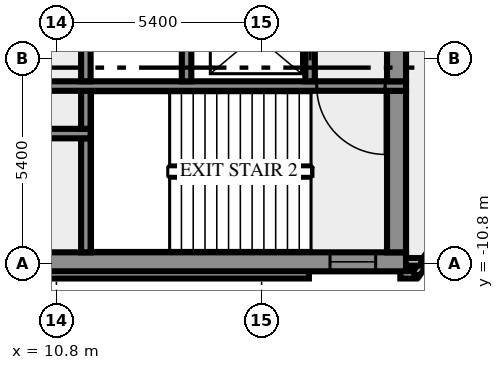
"""IFC4 building model, lengths in metres.
Left out: names, types, materials, properties, quantities, classifications, styles, units other than length and angle.
Written with IfcOpenShell. Run it as: python <this file> out.ifc"""

import sys

from ifc_helpers import new_model, si_unit, direction, frame, frame_2d, origin, place, context, subcontext, project, spatial, rectangle, extrude, element, fill, save


model = new_model("IFC4")
c1 = context("Model", 3, precision=1e-05, world=origin(), true_north=direction((0.0, 1.0)))
c2 = subcontext(c1, "Body", "Model", "MODEL_VIEW")
j1 = project(units=[si_unit("LENGTHUNIT", "METRE"), si_unit("PLANEANGLEUNIT", "RADIAN")], contexts=[c1])
p1 = place(None, origin())
s1 = spatial("IfcSite", under=j1, at=p1, CompositionType="ELEMENT")
p2 = place(p1, origin())
s2 = spatial("IfcBuilding", under=s1, at=p2, CompositionType="ELEMENT")
p3 = place(p2, frame((0.0, 0.0, 257.0)))
s3 = spatial("IfcBuildingStorey", under=s2, at=p3, CompositionType="ELEMENT", Elevation=257.0)
p4 = place(p3, frame((-17.444, -11.088, 0.0), z_axis=(0.0, 0.0, 1.0), x_axis=(1.0, 0.0, 0.0)))
e1 = element("IfcWall", 1, at=p4, inside=s3, PredefinedType="SOLIDWALL", context=c2, shape_type="SweptSolid", body=[
    extrude(rectangle(XDim=34.888, YDim=0.2, at=frame_2d((17.444, 0.0))), origin(), (0.0, 0.0, 1.0), 3.65),
])
p5 = place(p3, frame((19.85, -11.088, 0.0), z_axis=(0.0, 0.0, 1.0), x_axis=(1.0, 0.0, 0.0)))
e2 = element("IfcWall", 2, at=p5, inside=s3, PredefinedType="SOLIDWALL", context=c2, shape_type="SweptSolid", body=[
    extrude(rectangle(XDim=0.406, YDim=0.2, at=frame_2d((0.203, 0.0))), origin(), (0.0, 0.0, 1.0), 3.65),
])
p6 = place(p3, frame((20.253, -11.083, 0.0), z_axis=(0.0, 0.0, 1.0), x_axis=(0.587766567315, 0.809030569476, 0.0)))
e3 = element("IfcWall", 3, at=p6, inside=s3, PredefinedType="SOLIDWALL", context=c2, shape_type="SweptSolid", body=[
    extrude(rectangle(XDim=2.688, YDim=0.2, at=frame_2d((1.344, 0.0))), origin(), (0.0, 0.0, 1.0), 3.65),
])
p7 = place(p3, frame((19.98, -10.75, 0.0), z_axis=(0.0, 0.0, 1.0), x_axis=(1.0, 0.0, 0.0)))
e4 = element("IfcWall", 4, at=p7, inside=s3, PredefinedType="SOLIDWALL", context=c2, shape_type="SweptSolid", body=[
    extrude(rectangle(XDim=0.417, YDim=0.2, at=frame_2d((0.208, 0.0))), origin(), (0.0, 0.0, 1.0), 3.65),
])
p8 = place(p3, frame((-20.0, -10.75, 0.0), z_axis=(0.0, 0.0, 1.0), x_axis=(1.0, 0.0, 0.0)))
e5 = element("IfcWall", 5, at=p8, inside=s3, PredefinedType="SHEAR", context=c2, shape_type="SweptSolid", body=[
    extrude(rectangle(XDim=40.0, YDim=0.5, at=frame_2d((20.0, 0.0))), origin(), (0.0, 0.0, 1.0), 3.65),
])
p9 = place(p8, frame((0.8, 0.0, 1.0)))
e6 = element("IfcOpeningElement", 6, at=p9, cuts=e5, PredefinedType="OPENING", context=c2, shape_type="SweptSolid", body=[
    extrude(rectangle(XDim=1.2, YDim=1.2, at=frame_2d((0.6, 0.6))), frame((0.0, 0.26, 0.0), z_axis=(0.0, -1.0, 0.0), x_axis=(1.0, 0.0, 0.0)), (0.0, 0.0, 1.0), 0.52),
])
p10 = place(p8, frame((38.0, 0.0, 1.0)))
e7 = element("IfcOpeningElement", 7, at=p10, cuts=e5, PredefinedType="OPENING", context=c2, shape_type="SweptSolid", body=[
    extrude(rectangle(XDim=1.2, YDim=1.2, at=frame_2d((0.6, 0.6))), frame((0.0, 0.26, 0.0), z_axis=(0.0, -1.0, 0.0), x_axis=(1.0, 0.0, 0.0)), (0.0, 0.0, 1.0), 0.52),
])
p11 = place(p3, frame((11.575, -10.5, 0.0), z_axis=(0.0, 0.0, 1.0), x_axis=(0.0, 1.0, 0.0)))
e8 = element("IfcWall", 8, at=p11, inside=s3, PredefinedType="SHEAR", context=c2, shape_type="SweptSolid", body=[
    extrude(rectangle(XDim=3.0, YDim=0.25, at=frame_2d((1.5, 0.0))), origin(), (0.0, 0.0, 1.0), 3.65),
])
p12 = place(p3, frame((19.75, -10.5, 0.0), z_axis=(0.0, 0.0, 1.0), x_axis=(0.0, 1.0, 0.0)))
e9 = element("IfcWall", 9, at=p12, inside=s3, PredefinedType="SHEAR", context=c2, shape_type="SweptSolid", body=[
    extrude(rectangle(XDim=4.25, YDim=0.5, at=frame_2d((2.125, 0.0))), origin(), (0.0, 0.0, 1.0), 3.65),
])
p13 = place(p3, frame((11.7, -7.375, 0.0), z_axis=(0.0, 0.0, 1.0), x_axis=(-1.0, 0.0, 0.0)))
e10 = element("IfcWall", 10, at=p13, inside=s3, PredefinedType="SHEAR", context=c2, shape_type="SweptSolid", body=[
    extrude(rectangle(XDim=23.4, YDim=0.25, at=frame_2d((11.7, 0.0))), origin(), (0.0, 0.0, 1.0), 3.65),
])
p14 = place(p13, frame((22.225, 0.0, 0.0)))
e11 = element("IfcOpeningElement", 11, at=p14, cuts=e10, PredefinedType="OPENING", context=c2, shape_type="SweptSolid", body=[
    extrude(rectangle(XDim=0.8, YDim=2.1, at=frame_2d((0.4, 1.05))), frame((0.0, 0.135, 0.0), z_axis=(0.0, -1.0, 0.0), x_axis=(1.0, 0.0, 0.0)), (0.0, 0.0, 1.0), 0.27),
])
p15 = place(p13, frame((20.2, 0.0, 0.0)))
e12 = element("IfcOpeningElement", 12, at=p15, cuts=e10, PredefinedType="OPENING", context=c2, shape_type="SweptSolid", body=[
    extrude(rectangle(XDim=1.1, YDim=2.1, at=frame_2d((0.55, 1.05))), frame((0.0, 0.135, 0.0), z_axis=(0.0, -1.0, 0.0), x_axis=(1.0, 0.0, 0.0)), (0.0, 0.0, 1.0), 0.27),
])
p16 = place(p13, frame((17.7, 0.0, 0.0)))
e13 = element("IfcOpeningElement", 13, at=p16, cuts=e10, PredefinedType="OPENING", context=c2, shape_type="SweptSolid", body=[
    extrude(rectangle(XDim=1.1, YDim=2.1, at=frame_2d((0.55, 1.05))), frame((0.0, 0.135, 0.0), z_axis=(0.0, -1.0, 0.0), x_axis=(1.0, 0.0, 0.0)), (0.0, 0.0, 1.0), 0.27),
])
p17 = place(p13, frame((15.975, 0.0, 0.0)))
e14 = element("IfcOpeningElement", 14, at=p17, cuts=e10, PredefinedType="OPENING", context=c2, shape_type="SweptSolid", body=[
    extrude(rectangle(XDim=0.8, YDim=2.1, at=frame_2d((0.4, 1.05))), frame((0.0, 0.135, 0.0), z_axis=(0.0, -1.0, 0.0), x_axis=(1.0, 0.0, 0.0)), (0.0, 0.0, 1.0), 0.27),
])
p18 = place(p13, frame((14.75, 0.0, 0.0)))
e15 = element("IfcOpeningElement", 15, at=p18, cuts=e10, PredefinedType="OPENING", context=c2, shape_type="SweptSolid", body=[
    extrude(rectangle(XDim=0.7, YDim=2.1, at=frame_2d((0.35, 1.05))), frame((0.0, 0.135, 0.0), z_axis=(0.0, -1.0, 0.0), x_axis=(1.0, 0.0, 0.0)), (0.0, 0.0, 1.0), 0.27),
])
p19 = place(p13, frame((13.35, 0.0, 0.0)))
e16 = element("IfcOpeningElement", 16, at=p19, cuts=e10, PredefinedType="OPENING", context=c2, shape_type="SweptSolid", body=[
    extrude(rectangle(XDim=0.9, YDim=2.1, at=frame_2d((0.45, 1.05))), frame((0.0, 0.135, 0.0), z_axis=(0.0, -1.0, 0.0), x_axis=(1.0, 0.0, 0.0)), (0.0, 0.0, 1.0), 0.27),
])
p20 = place(p13, frame((11.975, 0.0, 0.0)))
e17 = element("IfcOpeningElement", 17, at=p20, cuts=e10, PredefinedType="OPENING", context=c2, shape_type="SweptSolid", body=[
    extrude(rectangle(XDim=0.9, YDim=2.1, at=frame_2d((0.45, 1.05))), frame((0.0, 0.135, 0.0), z_axis=(0.0, -1.0, 0.0), x_axis=(1.0, 0.0, 0.0)), (0.0, 0.0, 1.0), 0.27),
])
p21 = place(p13, frame((10.5, 0.0, 0.0)))
e18 = element("IfcOpeningElement", 18, at=p21, cuts=e10, PredefinedType="OPENING", context=c2, shape_type="SweptSolid", body=[
    extrude(rectangle(XDim=0.9, YDim=2.1, at=frame_2d((0.45, 1.05))), frame((0.0, 0.135, 0.0), z_axis=(0.0, -1.0, 0.0), x_axis=(1.0, 0.0, 0.0)), (0.0, 0.0, 1.0), 0.27),
])
p22 = place(p13, frame((8.388, 0.0, 0.0)))
e19 = element("IfcOpeningElement", 19, at=p22, cuts=e10, PredefinedType="OPENING", context=c2, shape_type="SweptSolid", body=[
    extrude(rectangle(XDim=0.9, YDim=2.1, at=frame_2d((0.45, 1.05))), frame((0.0, 0.135, 0.0), z_axis=(0.0, -1.0, 0.0), x_axis=(1.0, 0.0, 0.0)), (0.0, 0.0, 1.0), 0.27),
])
p23 = place(p13, frame((5.375, 0.0, 0.0)))
e20 = element("IfcOpeningElement", 20, at=p23, cuts=e10, PredefinedType="OPENING", context=c2, shape_type="SweptSolid", body=[
    extrude(rectangle(XDim=0.9, YDim=2.1, at=frame_2d((0.45, 1.05))), frame((0.0, 0.135, 0.0), z_axis=(0.0, -1.0, 0.0), x_axis=(1.0, 0.0, 0.0)), (0.0, 0.0, 1.0), 0.27),
])
p24 = place(p13, frame((1.688, 0.0, 0.0)))
e21 = element("IfcOpeningElement", 21, at=p24, cuts=e10, PredefinedType="OPENING", context=c2, shape_type="SweptSolid", body=[
    extrude(rectangle(XDim=0.9, YDim=2.1, at=frame_2d((0.45, 1.05))), frame((0.0, 0.135, 0.0), z_axis=(0.0, -1.0, 0.0), x_axis=(1.0, 0.0, 0.0)), (0.0, 0.0, 1.0), 0.27),
])
p25 = place(p3, frame((11.575, -7.25, 0.0), z_axis=(0.0, 0.0, 1.0), x_axis=(0.0, 1.0, 0.0)))
e22 = element("IfcWall", 22, at=p25, inside=s3, PredefinedType="SHEAR", context=c2, shape_type="SweptSolid", body=[
    extrude(rectangle(XDim=1.0, YDim=0.25, at=frame_2d((0.5, 0.0))), origin(), (0.0, 0.0, 1.0), 3.65),
])
p26 = place(p3, frame((20.0, -6.125, 0.0), z_axis=(0.0, 0.0, 1.0), x_axis=(-1.0, 0.0, 0.0)))
e23 = element("IfcWall", 23, at=p26, inside=s3, PredefinedType="SHEAR", context=c2, shape_type="SweptSolid", body=[
    extrude(rectangle(XDim=10.2, YDim=0.25, at=frame_2d((5.1, 0.0))), origin(), (0.0, 0.0, 1.0), 3.65),
])
p27 = place(p26, frame((0.55, 0.0, 0.0)))
e24 = element("IfcOpeningElement", 24, at=p27, cuts=e23, PredefinedType="OPENING", context=c2, shape_type="SweptSolid", body=[
    extrude(rectangle(XDim=1.8, YDim=2.1, at=frame_2d((0.9, 1.05))), frame((0.0, 0.135, 0.0), z_axis=(0.0, -1.0, 0.0), x_axis=(1.0, 0.0, 0.0)), (0.0, 0.0, 1.0), 0.27),
])
for number, where, z_axis, x_axis in (
    (25, (11.575, -6.0, 0.0), (0.0, 0.0, 1.0), (0.0, 1.0, 0.0)),
    (26, (14.225, -6.0, 0.0), (0.0, 0.0, 1.0), (0.0, 1.0, 0.0)),
):
    element("IfcWall", number, at=place(p3, frame(where, z_axis=z_axis, x_axis=x_axis)), inside=s3, PredefinedType="SHEAR", context=c2, shape_type="SweptSolid", body=[
        extrude(rectangle(XDim=1.75, YDim=0.25, at=frame_2d((0.875, 0.0))), origin(), (0.0, 0.0, 1.0), 3.65),
    ])
p28 = place(p3, frame((17.475, -6.0, 0.0), z_axis=(0.0, 0.0, 1.0), x_axis=(0.0, 1.0, 0.0)))
e27 = element("IfcWall", 27, at=p28, inside=s3, PredefinedType="SHEAR", context=c2, shape_type="SweptSolid", body=[
    extrude(rectangle(XDim=4.3, YDim=0.25, at=frame_2d((2.15, 0.0))), origin(), (0.0, 0.0, 1.0), 3.65),
])
p29 = place(p28, frame((0.55, 0.0, 0.0)))
e28 = element("IfcOpeningElement", 28, at=p29, cuts=e27, PredefinedType="OPENING", context=c2, shape_type="SweptSolid", body=[
    extrude(rectangle(XDim=1.3, YDim=2.1, at=frame_2d((0.65, 1.05))), frame((0.0, 0.135, 0.0), z_axis=(0.0, -1.0, 0.0), x_axis=(1.0, 0.0, 0.0)), (0.0, 0.0, 1.0), 0.27),
])
p30 = place(p3, frame((19.75, -6.0, 0.0), z_axis=(0.0, 0.0, 1.0), x_axis=(0.0, 1.0, 0.0)))
e29 = element("IfcWall", 29, at=p30, inside=s3, PredefinedType="SHEAR", context=c2, shape_type="SweptSolid", body=[
    extrude(rectangle(XDim=4.3, YDim=0.5, at=frame_2d((2.15, 0.0))), origin(), (0.0, 0.0, 1.0), 3.65),
])
p31 = place(p10, origin())
e30 = element("IfcWindow", 30, at=p31, inside=s3, PartitioningType="SINGLE_PANEL", PredefinedType="WINDOW", context=c2, shape_type="SweptSolid", body=[
    extrude(rectangle(XDim=1.2, YDim=1.2, at=frame_2d((0.6, 0.6))), frame((0.0, 0.03, 0.0), z_axis=(0.0, -1.0, 0.0), x_axis=(1.0, 0.0, 0.0)), (0.0, 0.0, 1.0), 0.06),
])
fill(e7, e30)
p32 = place(p27, origin())
e31 = element("IfcDoor", 31, at=p32, inside=s3, OperationType="DOUBLE_DOOR_SINGLE_SWING", PredefinedType="DOOR", context=c2, shape_type="SweptSolid", body=[
    extrude(rectangle(XDim=1.8, YDim=2.1, at=frame_2d((0.9, 1.05))), frame((0.0, 0.025, 0.0), z_axis=(0.0, -1.0, 0.0), x_axis=(1.0, 0.0, 0.0)), (0.0, 0.0, 1.0), 0.05),
])
fill(e24, e31)
p33 = place(p29, origin())
e32 = element("IfcDoor", 32, at=p33, inside=s3, OperationType="DOUBLE_DOOR_SLIDING", PredefinedType="DOOR", context=c2, shape_type="SweptSolid", body=[
    extrude(rectangle(XDim=1.3, YDim=2.1, at=frame_2d((0.65, 1.05))), frame((0.0, 0.025, 0.0), z_axis=(0.0, -1.0, 0.0), x_axis=(1.0, 0.0, 0.0)), (0.0, 0.0, 1.0), 0.05),
])
fill(e28, e32)
save(model, sys.argv[1])
